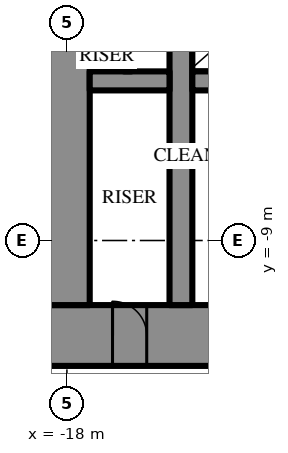
"""IFC4 building model, lengths in metres.
Left out: names, types, materials, properties, quantities, classifications, styles, units other than length and angle.
Written with IfcOpenShell. Run it as: python <this file> out.ifc"""

import sys

from ifc_helpers import new_model, si_unit, direction, frame, frame_2d, origin, place, context, subcontext, project, spatial, rectangle, extrude, element, fill, save


model = new_model("IFC4")
c1 = context("Model", 3, precision=1e-05, world=origin(), true_north=direction((0.0, 1.0)))
c2 = subcontext(c1, "Body", "Model", "MODEL_VIEW")
j1 = project(units=[si_unit("LENGTHUNIT", "METRE"), si_unit("PLANEANGLEUNIT", "RADIAN")], contexts=[c1])
p1 = place(None, origin())
s1 = spatial("IfcSite", under=j1, at=p1, CompositionType="ELEMENT")
p2 = place(p1, origin())
s2 = spatial("IfcBuilding", under=s1, at=p2, CompositionType="ELEMENT")
p3 = place(p2, frame((0.0, 0.0, 161.5)))
s3 = spatial("IfcBuildingStorey", under=s2, at=p3, CompositionType="ELEMENT", Elevation=161.5)
p4 = place(p3, frame((18.6, -11.5, 0.0), z_axis=(0.0, 0.0, 1.0), x_axis=(-1.0, 0.0, 0.0)))
e1 = element("IfcWall", 1, at=p4, inside=s3, PredefinedType="SHEAR", context=c2, shape_type="SweptSolid", body=[
    extrude(rectangle(XDim=37.2, YDim=1.6, at=frame_2d((18.6, 0.0))), origin(), (0.0, 0.0, 1.0), 4.2),
])
p5 = place(p4, frame((19.45, 0.0, 0.0)))
e2 = element("IfcOpeningElement", 2, at=p5, cuts=e1, PredefinedType="OPENING", context=c2, shape_type="SweptSolid", body=[
    extrude(rectangle(XDim=0.9, YDim=2.2, at=frame_2d((0.45, 1.1))), frame((0.0, 0.81, 0.0), z_axis=(0.0, -1.0, 0.0), x_axis=(1.0, 0.0, 0.0)), (0.0, 0.0, 1.0), 1.62),
])
p6 = place(p4, frame((22.45, 0.0, 0.0)))
e3 = element("IfcOpeningElement", 3, at=p6, cuts=e1, PredefinedType="OPENING", context=c2, shape_type="SweptSolid", body=[
    extrude(rectangle(XDim=0.9, YDim=2.2, at=frame_2d((0.45, 1.1))), frame((0.0, 0.81, 0.0), z_axis=(0.0, -1.0, 0.0), x_axis=(1.0, 0.0, 0.0)), (0.0, 0.0, 1.0), 1.62),
])
p7 = place(p4, frame((25.5, 0.0, 0.0)))
e4 = element("IfcOpeningElement", 4, at=p7, cuts=e1, PredefinedType="OPENING", context=c2, shape_type="SweptSolid", body=[
    extrude(rectangle(XDim=1.0, YDim=2.2, at=frame_2d((0.5, 1.1))), frame((0.0, 0.81, 0.0), z_axis=(0.0, -1.0, 0.0), x_axis=(1.0, 0.0, 0.0)), (0.0, 0.0, 1.0), 1.62),
])
p8 = place(p4, frame((1.8, 0.0, 0.0)))
e5 = element("IfcOpeningElement", 5, at=p8, cuts=e1, PredefinedType="OPENING", context=c2, shape_type="SweptSolid", body=[
    extrude(rectangle(XDim=0.9, YDim=2.2, at=frame_2d((0.45, 1.1))), frame((0.0, 0.81, 0.0), z_axis=(0.0, -1.0, 0.0), x_axis=(1.0, 0.0, 0.0)), (0.0, 0.0, 1.0), 1.62),
])
p9 = place(p4, frame((4.65, 0.0, 0.0)))
e6 = element("IfcOpeningElement", 6, at=p9, cuts=e1, PredefinedType="OPENING", context=c2, shape_type="SweptSolid", body=[
    extrude(rectangle(XDim=0.9, YDim=2.2, at=frame_2d((0.45, 1.1))), frame((0.0, 0.81, 0.0), z_axis=(0.0, -1.0, 0.0), x_axis=(1.0, 0.0, 0.0)), (0.0, 0.0, 1.0), 1.62),
])
p10 = place(p4, frame((7.75, 0.0, 0.0)))
e7 = element("IfcOpeningElement", 7, at=p10, cuts=e1, PredefinedType="OPENING", context=c2, shape_type="SweptSolid", body=[
    extrude(rectangle(XDim=0.9, YDim=2.2, at=frame_2d((0.45, 1.1))), frame((0.0, 0.81, 0.0), z_axis=(0.0, -1.0, 0.0), x_axis=(1.0, 0.0, 0.0)), (0.0, 0.0, 1.0), 1.62),
])
p11 = place(p4, frame((28.55, 0.0, 0.0)))
e8 = element("IfcOpeningElement", 8, at=p11, cuts=e1, PredefinedType="OPENING", context=c2, shape_type="SweptSolid", body=[
    extrude(rectangle(XDim=0.9, YDim=2.2, at=frame_2d((0.45, 1.1))), frame((0.0, 0.81, 0.0), z_axis=(0.0, -1.0, 0.0), x_axis=(1.0, 0.0, 0.0)), (0.0, 0.0, 1.0), 1.62),
])
p12 = place(p4, frame((31.65, 0.0, 0.0)))
e9 = element("IfcOpeningElement", 9, at=p12, cuts=e1, PredefinedType="OPENING", context=c2, shape_type="SweptSolid", body=[
    extrude(rectangle(XDim=0.9, YDim=2.2, at=frame_2d((0.45, 1.1))), frame((0.0, 0.81, 0.0), z_axis=(0.0, -1.0, 0.0), x_axis=(1.0, 0.0, 0.0)), (0.0, 0.0, 1.0), 1.62),
])
p13 = place(p4, frame((34.5, 0.0, 0.0)))
e10 = element("IfcOpeningElement", 10, at=p13, cuts=e1, PredefinedType="OPENING", context=c2, shape_type="SweptSolid", body=[
    extrude(rectangle(XDim=0.9, YDim=2.2, at=frame_2d((0.45, 1.1))), frame((0.0, 0.81, 0.0), z_axis=(0.0, -1.0, 0.0), x_axis=(1.0, 0.0, 0.0)), (0.0, 0.0, 1.0), 1.62),
])
p14 = place(p3, frame((-18.0, 10.7, 0.0), z_axis=(0.0, 0.0, 1.0), x_axis=(0.0, -1.0, 0.0)))
e11 = element("IfcWall", 11, at=p14, inside=s3, PredefinedType="SHEAR", context=c2, shape_type="SweptSolid", body=[
    extrude(rectangle(XDim=21.4, YDim=1.2, at=frame_2d((10.7, 0.0))), origin(), (0.0, 0.0, 1.0), 4.2),
])
p15 = place(p14, frame((9.8, 0.0, 0.0)))
e12 = element("IfcOpeningElement", 12, at=p15, cuts=e11, PredefinedType="OPENING", context=c2, shape_type="SweptSolid", body=[
    extrude(rectangle(XDim=1.8, YDim=2.4, at=frame_2d((0.9, 1.2))), frame((0.0, 0.61, 0.0), z_axis=(0.0, -1.0, 0.0), x_axis=(1.0, 0.0, 0.0)), (0.0, 0.0, 1.0), 1.22),
])
p16 = place(p3, frame((-15.0, -10.7, 0.0), z_axis=(0.0, 0.0, 1.0), x_axis=(0.0, 1.0, 0.0)))
e13 = element("IfcWall", 13, at=p16, inside=s3, PredefinedType="SHEAR", context=c2, shape_type="SweptSolid", body=[
    extrude(rectangle(XDim=21.4, YDim=0.6, at=frame_2d((10.7, 0.0))), origin(), (0.0, 0.0, 1.0), 4.2),
])
p17 = place(p16, frame((9.8, 0.0, 0.0)))
e14 = element("IfcOpeningElement", 14, at=p17, cuts=e13, PredefinedType="OPENING", context=c2, shape_type="SweptSolid", body=[
    extrude(rectangle(XDim=1.8, YDim=2.4, at=frame_2d((0.9, 1.2))), frame((0.0, 0.31, 0.0), z_axis=(0.0, -1.0, 0.0), x_axis=(1.0, 0.0, 0.0)), (0.0, 0.0, 1.0), 0.62),
])
p18 = place(p3, frame((-12.3, -4.8, 0.0), z_axis=(0.0, 0.0, 1.0), x_axis=(-1.0, 0.0, 0.0)))
e15 = element("IfcWall", 15, at=p18, inside=s3, PredefinedType="SHEAR", context=c2, shape_type="SweptSolid", body=[
    extrude(rectangle(XDim=2.4, YDim=0.5, at=frame_2d((1.2, 0.0))), origin(), (0.0, 0.0, 1.0), 4.2),
])
p19 = place(p3, frame((-15.3, -4.8, 0.0), z_axis=(0.0, 0.0, 1.0), x_axis=(-1.0, 0.0, 0.0)))
e16 = element("IfcWall", 16, at=p19, inside=s3, PredefinedType="SHEAR", context=c2, shape_type="SweptSolid", body=[
    extrude(rectangle(XDim=2.1, YDim=0.5, at=frame_2d((1.05, 0.0))), origin(), (0.0, 0.0, 1.0), 4.2),
])
p20 = place(p3, frame((-16.4, -3.55, 0.0), z_axis=(0.0, 0.0, 1.0), x_axis=(0.0, -1.0, 0.0)))
e17 = element("IfcWall", 17, at=p20, inside=s3, PredefinedType="PARTITIONING", context=c2, shape_type="SweptSolid", body=[
    extrude(rectangle(XDim=1.0, YDim=0.2, at=frame_2d((0.5, 0.0))), origin(), (0.0, 0.0, 1.0), 4.0),
])
p21 = place(p13, frame((0.9, 0.0, 0.0), z_axis=(0.0, 0.0, 1.0), x_axis=(-1.0, 0.0, 0.0)))
e18 = element("IfcDoor", 18, at=p21, inside=s3, OperationType="SINGLE_SWING_RIGHT", PredefinedType="DOOR", context=c2, shape_type="SweptSolid", body=[
    extrude(rectangle(XDim=0.9, YDim=2.2, at=frame_2d((0.45, 1.1))), frame((0.0, 0.025, 0.0), z_axis=(0.0, -1.0, 0.0), x_axis=(1.0, 0.0, 0.0)), (0.0, 0.0, 1.0), 0.05),
])
fill(e10, e18)
save(model, sys.argv[1])
